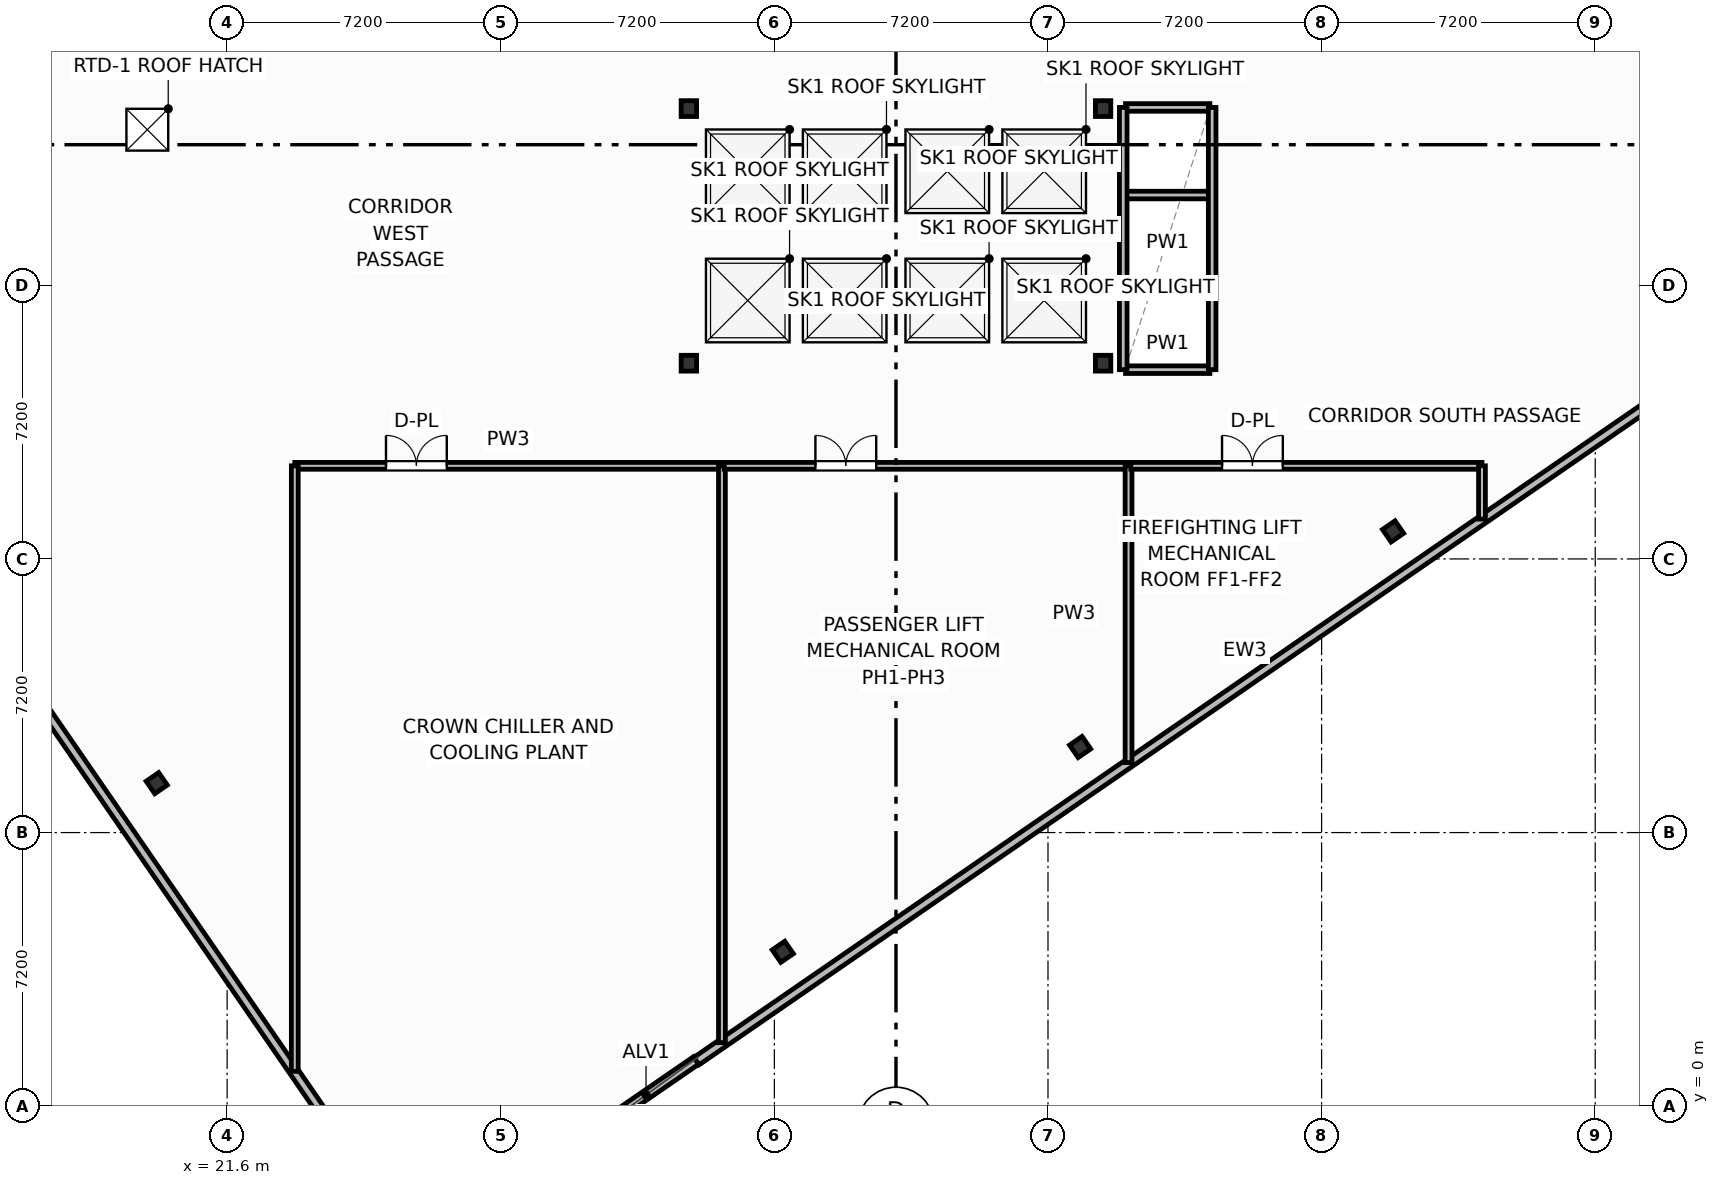
"""IFC4 building model, lengths in metres.
Left out: names, types, materials, properties, quantities, classifications, styles, units other than length and angle.
Written with IfcOpenShell. Run it as: python <this file> out.ifc"""

import sys

from ifc_helpers import new_model, si_unit, direction, frame, frame_2d, origin, origin_2d, place, context, subcontext, project, spatial, rectangle, i_section, extrude, element, fill, save


model = new_model("IFC4")
c1 = context("Model", 3, precision=1e-05, world=origin(), true_north=direction((0.0, 1.0)))
c2 = subcontext(c1, "Body", "Model", "MODEL_VIEW")
j1 = project(units=[si_unit("LENGTHUNIT", "METRE"), si_unit("PLANEANGLEUNIT", "RADIAN")], contexts=[c1])
p1 = place(None, origin())
s1 = spatial("IfcSite", under=j1, at=p1, CompositionType="ELEMENT")
p2 = place(p1, origin())
s2 = spatial("IfcBuilding", under=s1, at=p2, CompositionType="ELEMENT")
p3 = place(p2, frame((0.0, 0.0, 301.1)))
s3 = spatial("IfcBuildingStorey", under=s2, at=p3, CompositionType="ELEMENT", Elevation=301.1)
for number, where, z_axis, x_axis in (
    (1, (33.75, 19.55, 0.0), (0.0, 0.0, 1.0), (1.0, 0.0, 0.0)),
    (2, (44.65, 19.55, 0.0), (0.0, 0.0, 1.0), (1.0, 0.0, 0.0)),
    (3, (33.75, 26.25, 0.0), (0.0, 0.0, 1.0), (1.0, 0.0, 0.0)),
    (4, (44.65, 26.25, 0.0), (0.0, 0.0, 1.0), (1.0, 0.0, 0.0)),
):
    element("IfcColumn", number, at=place(p3, frame(where, z_axis=z_axis, x_axis=x_axis)), inside=s3, PredefinedType="COLUMN", context=c2, shape_type="SweptSolid", body=[
        extrude(i_section(OverallWidth=0.406, OverallDepth=0.416, WebThickness=0.03, FlangeThickness=0.048, FilletRadius=0.025, at=origin_2d()), origin(), (0.0, 0.0, 1.0), 4.8),
    ])
for number, where, z_axis, x_axis in (
    (5, (36.222, 4.063, 0.0), (0.0, 0.0, 1.0), (0.824, 0.567, 0.0)),
    (6, (44.045, 9.452, 0.0), (0.0, 0.0, 1.0), (0.824, 0.567, 0.0)),
    (7, (52.281, 15.125, 0.0), (0.0, 0.0, 1.0), (0.824, 0.567, 0.0)),
    (8, (19.747, 8.5, 0.0), (0.0, 0.0, 1.0), (0.824, 0.567, 0.0)),
):
    element("IfcColumn", number, at=place(p3, frame(where, z_axis=z_axis, x_axis=x_axis)), inside=s3, PredefinedType="COLUMN", context=c2, shape_type="SweptSolid", body=[
        extrude(i_section(OverallWidth=0.401, OverallDepth=0.399, WebThickness=0.025, FlangeThickness=0.04, FilletRadius=0.022, at=origin_2d()), origin(), (0.0, 0.0, 1.0), 4.8),
    ])
p4 = place(p3, frame((33.941, 1.204, 0.0), z_axis=(0.0, 0.0, 1.0), x_axis=(-0.823538491217, -0.567260393015, 0.0)))
e9 = element("IfcWall", 9, at=p4, inside=s3, PredefinedType="SOLIDWALL", context=c2, shape_type="SweptSolid", body=[
    extrude(rectangle(XDim=3.2, YDim=0.24, at=frame_2d((1.6, 0.0))), origin(), (0.0, 0.0, 1.0), 0.65),
])
p5 = place(p3, frame((33.952, 1.188, 0.0), z_axis=(0.0, 0.0, 1.0), x_axis=(0.823534980344, 0.567265490005, 0.0)))
e10 = element("IfcWall", 10, at=p5, inside=s3, PredefinedType="SOLIDWALL", context=c2, shape_type="SweptSolid", body=[
    extrude(rectangle(XDim=36.01, YDim=0.24, at=frame_2d((18.005, 0.0))), origin(), (0.0, 0.0, 1.0), 3.83),
])
p6 = place(p3, frame((9.991, 20.319, 0.0), z_axis=(0.0, 0.0, 1.0), x_axis=(0.567271592362, -0.823530776898, 0.0)))
e11 = element("IfcWall", 11, at=p6, inside=s3, PredefinedType="SOLIDWALL", context=c2, shape_type="SweptSolid", body=[
    extrude(rectangle(XDim=24.934, YDim=0.24, at=frame_2d((12.467, 0.0))), origin(), (0.0, 0.0, 1.0), 3.83),
])
p7 = place(p3, frame((23.38, 16.85, 0.0), z_axis=(0.0, 0.0, 1.0), x_axis=(1.0, 0.0, 0.0)))
e12 = element("IfcWall", 12, at=p7, inside=s3, PredefinedType="PARTITIONING", context=c2, shape_type="SweptSolid", body=[
    extrude(rectangle(XDim=11.24, YDim=0.18, at=frame_2d((5.62, 0.0))), origin(), (0.0, 0.0, 1.0), 4.55),
])
p8 = place(p7, frame((2.4, 0.0, 0.0)))
e13 = element("IfcOpeningElement", 13, at=p8, cuts=e12, PredefinedType="OPENING", context=c2, shape_type="SweptSolid", body=[
    extrude(rectangle(XDim=1.6, YDim=2.05, at=frame_2d((0.8, 1.025))), frame((0.0, 0.1, 0.0), z_axis=(0.0, -1.0, 0.0), x_axis=(1.0, 0.0, 0.0)), (0.0, 0.0, 1.0), 0.2),
])
p9 = place(p3, frame((34.62, 1.672, 0.0), z_axis=(0.0, 0.0, 1.0), x_axis=(0.0, 1.0, 0.0)))
e14 = element("IfcWall", 14, at=p9, inside=s3, PredefinedType="PARTITIONING", context=c2, shape_type="SweptSolid", body=[
    extrude(rectangle(XDim=15.178, YDim=0.18, at=frame_2d((7.589, 0.0))), origin(), (0.0, 0.0, 1.0), 3.839),
])
p10 = place(p3, frame((23.38, 0.917, 0.0), z_axis=(0.0, 0.0, 1.0), x_axis=(0.0, 1.0, 0.0)))
e15 = element("IfcWall", 15, at=p10, inside=s3, PredefinedType="PARTITIONING", context=c2, shape_type="SweptSolid", body=[
    extrude(rectangle(XDim=15.933, YDim=0.18, at=frame_2d((7.967, 0.0))), origin(), (0.0, 0.0, 1.0), 4.55),
])
p11 = place(p3, frame((34.68, 16.85, 0.0), z_axis=(0.0, 0.0, 1.0), x_axis=(1.0, 0.0, 0.0)))
e16 = element("IfcWall", 16, at=p11, inside=s3, PredefinedType="PARTITIONING", context=c2, shape_type="SweptSolid", body=[
    extrude(rectangle(XDim=10.64, YDim=0.18, at=frame_2d((5.32, 0.0))), origin(), (0.0, 0.0, 1.0), 4.55),
])
p12 = place(p11, frame((2.4, 0.0, 0.0)))
e17 = element("IfcOpeningElement", 17, at=p12, cuts=e16, PredefinedType="OPENING", context=c2, shape_type="SweptSolid", body=[
    extrude(rectangle(XDim=1.6, YDim=2.05, at=frame_2d((0.8, 1.025))), frame((0.0, 0.1, 0.0), z_axis=(0.0, -1.0, 0.0), x_axis=(1.0, 0.0, 0.0)), (0.0, 0.0, 1.0), 0.2),
])
p13 = place(p3, frame((45.32, 9.043, 0.0), z_axis=(0.0, 0.0, 1.0), x_axis=(0.0, 1.0, 0.0)))
e18 = element("IfcWall", 18, at=p13, inside=s3, PredefinedType="PARTITIONING", context=c2, shape_type="SweptSolid", body=[
    extrude(rectangle(XDim=7.807, YDim=0.18, at=frame_2d((3.904, 0.0))), origin(), (0.0, 0.0, 1.0), 4.55),
])
p14 = place(p3, frame((45.38, 16.85, 0.0), z_axis=(0.0, 0.0, 1.0), x_axis=(1.0, 0.0, 0.0)))
e19 = element("IfcWall", 19, at=p14, inside=s3, PredefinedType="PARTITIONING", context=c2, shape_type="SweptSolid", body=[
    extrude(rectangle(XDim=9.24, YDim=0.18, at=frame_2d((4.62, 0.0))), origin(), (0.0, 0.0, 1.0), 4.55),
])
p15 = place(p14, frame((2.4, 0.0, 0.0)))
e20 = element("IfcOpeningElement", 20, at=p15, cuts=e19, PredefinedType="OPENING", context=c2, shape_type="SweptSolid", body=[
    extrude(rectangle(XDim=1.6, YDim=2.05, at=frame_2d((0.8, 1.025))), frame((0.0, 0.1, 0.0), z_axis=(0.0, -1.0, 0.0), x_axis=(1.0, 0.0, 0.0)), (0.0, 0.0, 1.0), 0.2),
])
p16 = place(p3, frame((54.62, 15.449, 0.0), z_axis=(0.0, 0.0, 1.0), x_axis=(0.0, 1.0, 0.0)))
e21 = element("IfcWall", 21, at=p16, inside=s3, PredefinedType="PARTITIONING", context=c2, shape_type="SweptSolid", body=[
    extrude(rectangle(XDim=1.401, YDim=0.18, at=frame_2d((0.701, 0.0))), origin(), (0.0, 0.0, 1.0), 4.55),
])
for number, where, z_axis, x_axis in (
    (22, (45.24, 21.675, 0.0), (0.0, 0.0, 1.0), (1.0, 0.0, 0.0)),
    (23, (45.24, 23.975, 0.0), (0.0, 0.0, 1.0), (1.0, 0.0, 0.0)),
    (24, (45.24, 19.38, 0.0), (0.0, 0.0, 1.0), (1.0, 0.0, 0.0)),
    (25, (45.24, 26.28, 0.0), (0.0, 0.0, 1.0), (1.0, 0.0, 0.0)),
):
    element("IfcWall", number, at=place(p3, frame(where, z_axis=z_axis, x_axis=x_axis)), inside=s3, PredefinedType="PARTITIONING", context=c2, shape_type="SweptSolid", body=[
        extrude(rectangle(XDim=2.22, YDim=0.2, at=frame_2d((1.11, 0.0))), origin(), (0.0, 0.0, 1.0), 4.55),
    ])
for number, where, z_axis, x_axis in (
    (26, (45.18, 19.38, 0.0), (0.0, 0.0, 1.0), (0.0, 1.0, 0.0)),
    (27, (47.52, 19.38, 0.0), (0.0, 0.0, 1.0), (0.0, 1.0, 0.0)),
):
    element("IfcWall", number, at=place(p3, frame(where, z_axis=z_axis, x_axis=x_axis)), inside=s3, PredefinedType="PARTITIONING", context=c2, shape_type="SweptSolid", body=[
        extrude(rectangle(XDim=6.9, YDim=0.2, at=frame_2d((3.45, 0.0))), origin(), (0.0, 0.0, 1.0), 4.55),
    ])
p17 = place(p3, frame((0.0, 0.0, -0.25)))
p18 = place(p17, frame((35.3, 21.2, 0.0)))
p19 = place(p18, frame((0.0, 0.0, 0.2)))
e28 = element("IfcWindow", 28, at=p19, inside=s3, PartitioningType="SINGLE_PANEL", PredefinedType="SKYLIGHT", context=c2, shape_type="SweptSolid", body=[
    extrude(rectangle(XDim=2.2, YDim=2.2, at=origin_2d()), origin(), (0.0, 0.0, 1.0), 0.05),
])
p20 = place(p17, frame((37.85, 21.2, 0.0)))
p21 = place(p20, frame((0.0, 0.0, 0.2)))
e29 = element("IfcWindow", 29, at=p21, inside=s3, PartitioningType="SINGLE_PANEL", PredefinedType="SKYLIGHT", context=c2, shape_type="SweptSolid", body=[
    extrude(rectangle(XDim=2.2, YDim=2.2, at=origin_2d()), origin(), (0.0, 0.0, 1.0), 0.05),
])
p22 = place(p17, frame((40.55, 21.2, 0.0)))
p23 = place(p22, frame((0.0, 0.0, 0.2)))
e30 = element("IfcWindow", 30, at=p23, inside=s3, PartitioningType="SINGLE_PANEL", PredefinedType="SKYLIGHT", context=c2, shape_type="SweptSolid", body=[
    extrude(rectangle(XDim=2.2, YDim=2.2, at=origin_2d()), origin(), (0.0, 0.0, 1.0), 0.05),
])
p24 = place(p17, frame((43.1, 21.2, 0.0)))
p25 = place(p24, frame((0.0, 0.0, 0.2)))
e31 = element("IfcWindow", 31, at=p25, inside=s3, PartitioningType="SINGLE_PANEL", PredefinedType="SKYLIGHT", context=c2, shape_type="SweptSolid", body=[
    extrude(rectangle(XDim=2.2, YDim=2.2, at=origin_2d()), origin(), (0.0, 0.0, 1.0), 0.05),
])
p26 = place(p17, frame((35.3, 24.6, 0.0)))
p27 = place(p26, frame((0.0, 0.0, 0.2)))
e32 = element("IfcWindow", 32, at=p27, inside=s3, PartitioningType="SINGLE_PANEL", PredefinedType="SKYLIGHT", context=c2, shape_type="SweptSolid", body=[
    extrude(rectangle(XDim=2.2, YDim=2.2, at=origin_2d()), origin(), (0.0, 0.0, 1.0), 0.05),
])
p28 = place(p17, frame((37.85, 24.6, 0.0)))
p29 = place(p28, frame((0.0, 0.0, 0.2)))
e33 = element("IfcWindow", 33, at=p29, inside=s3, PartitioningType="SINGLE_PANEL", PredefinedType="SKYLIGHT", context=c2, shape_type="SweptSolid", body=[
    extrude(rectangle(XDim=2.2, YDim=2.2, at=origin_2d()), origin(), (0.0, 0.0, 1.0), 0.05),
])
p30 = place(p17, frame((40.55, 24.6, 0.0)))
p31 = place(p30, frame((0.0, 0.0, 0.2)))
e34 = element("IfcWindow", 34, at=p31, inside=s3, PartitioningType="SINGLE_PANEL", PredefinedType="SKYLIGHT", context=c2, shape_type="SweptSolid", body=[
    extrude(rectangle(XDim=2.2, YDim=2.2, at=origin_2d()), origin(), (0.0, 0.0, 1.0), 0.05),
])
p32 = place(p17, frame((43.1, 24.6, 0.0)))
p33 = place(p32, frame((0.0, 0.0, 0.2)))
e35 = element("IfcWindow", 35, at=p33, inside=s3, PartitioningType="SINGLE_PANEL", PredefinedType="SKYLIGHT", context=c2, shape_type="SweptSolid", body=[
    extrude(rectangle(XDim=2.2, YDim=2.2, at=origin_2d()), origin(), (0.0, 0.0, 1.0), 0.05),
])
p34 = place(p17, frame((19.5, 25.694, 0.0)))
p35 = place(p34, frame((0.0, 0.0, 0.2)))
e36 = element("IfcDoor", 36, at=p35, inside=s3, OperationType="SINGLE_SWING_LEFT", PredefinedType="TRAPDOOR", context=c2, shape_type="SweptSolid", body=[
    extrude(rectangle(XDim=1.1, YDim=1.1, at=origin_2d()), origin(), (0.0, 0.0, 1.0), 0.05),
])
p36 = place(p8, origin())
e37 = element("IfcDoor", 37, at=p36, inside=s3, OperationType="DOUBLE_DOOR_SINGLE_SWING", PredefinedType="DOOR", context=c2, shape_type="SweptSolid", body=[
    extrude(rectangle(XDim=1.6, YDim=2.05, at=frame_2d((0.8, 1.025))), frame((0.0, 0.025, 0.0), z_axis=(0.0, -1.0, 0.0), x_axis=(1.0, 0.0, 0.0)), (0.0, 0.0, 1.0), 0.05),
])
fill(e13, e37)
p37 = place(p12, origin())
e38 = element("IfcDoor", 38, at=p37, inside=s3, OperationType="DOUBLE_DOOR_SINGLE_SWING", PredefinedType="DOOR", context=c2, shape_type="SweptSolid", body=[
    extrude(rectangle(XDim=1.6, YDim=2.05, at=frame_2d((0.8, 1.025))), frame((0.0, 0.025, 0.0), z_axis=(0.0, -1.0, 0.0), x_axis=(1.0, 0.0, 0.0)), (0.0, 0.0, 1.0), 0.05),
])
fill(e17, e38)
p38 = place(p15, origin())
e39 = element("IfcDoor", 39, at=p38, inside=s3, OperationType="DOUBLE_DOOR_SINGLE_SWING", PredefinedType="DOOR", context=c2, shape_type="SweptSolid", body=[
    extrude(rectangle(XDim=1.6, YDim=2.05, at=frame_2d((0.8, 1.025))), frame((0.0, 0.025, 0.0), z_axis=(0.0, -1.0, 0.0), x_axis=(1.0, 0.0, 0.0)), (0.0, 0.0, 1.0), 0.05),
])
fill(e20, e39)
save(model, sys.argv[1])
